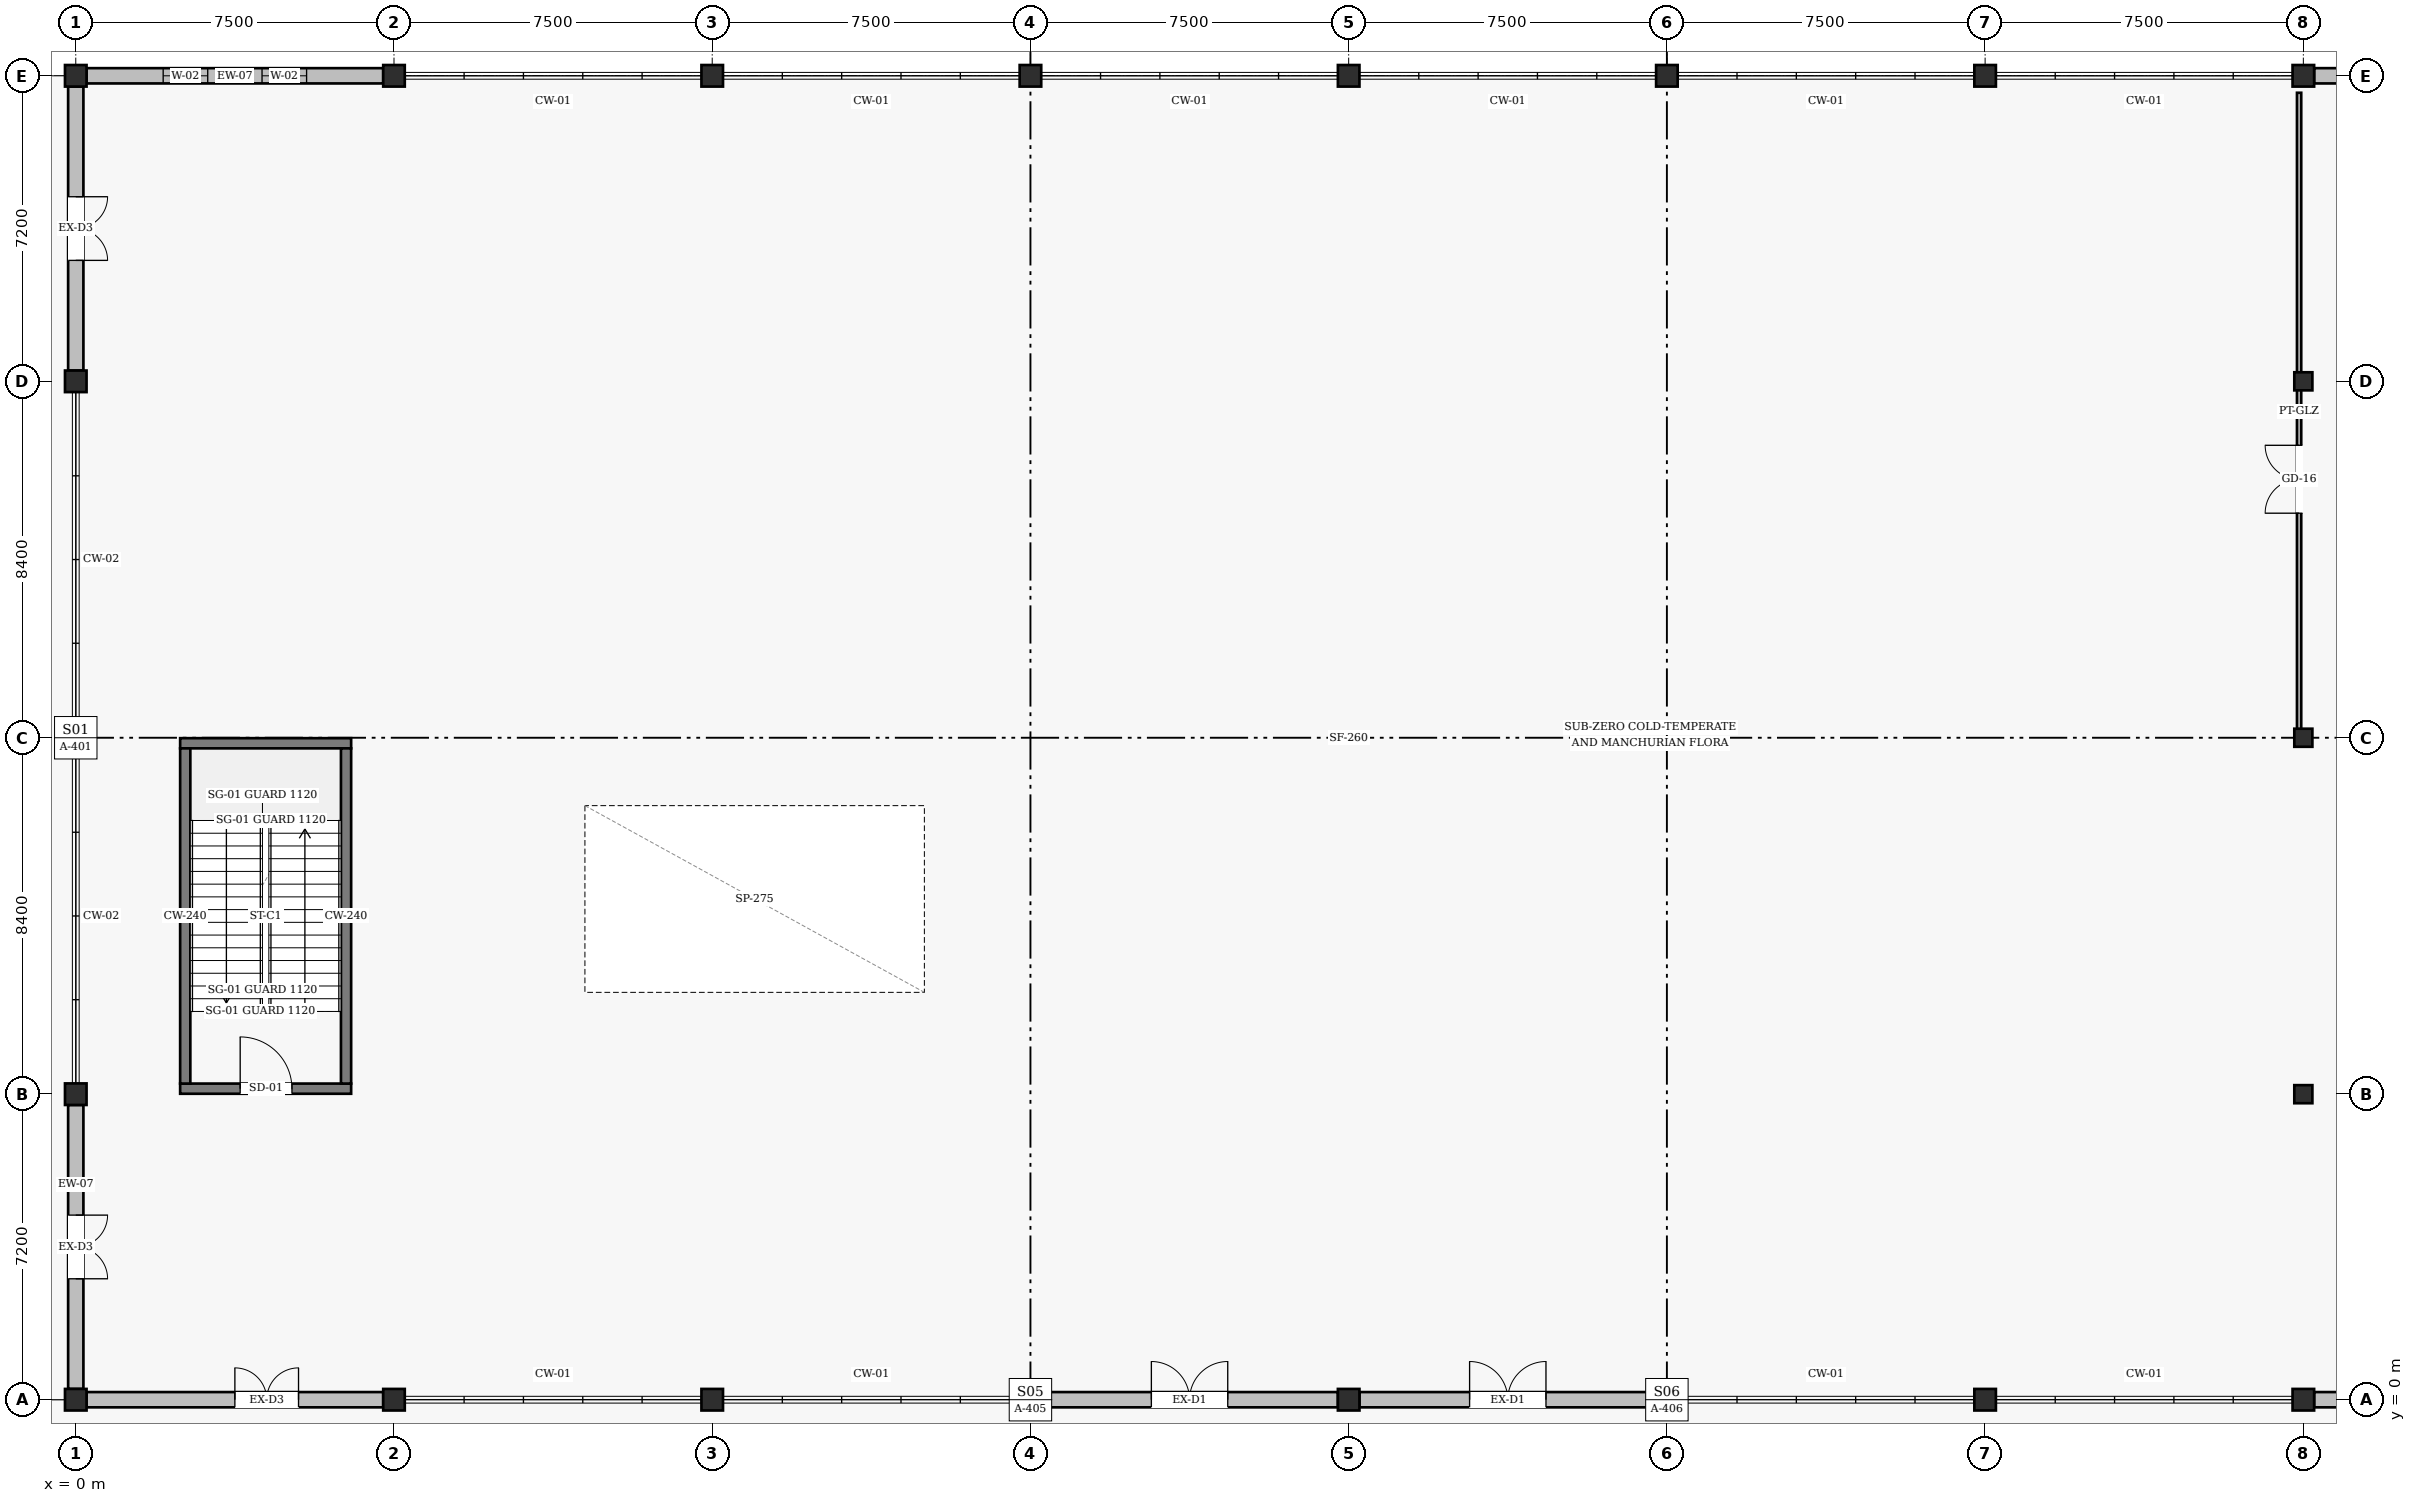
"""IFC4 building model, lengths in metres.
Left out: names, types, materials, properties, quantities, classifications, styles, units other than length and angle.
Written with IfcOpenShell. Run it as: python <this file> out.ifc"""

import sys

from ifc_helpers import new_model, si_unit, direction, frame, frame_2d, origin, origin_2d, place, context, subcontext, project, spatial, rectangle, hollow_circle, extrude, element, fill, save


model = new_model("IFC4")
c1 = context("Model", 3, precision=1e-05, world=origin(), true_north=direction((0.0, 1.0)))
c2 = subcontext(c1, "Body", "Model", "MODEL_VIEW")
j1 = project(units=[si_unit("LENGTHUNIT", "METRE"), si_unit("PLANEANGLEUNIT", "RADIAN")], contexts=[c1])
p1 = place(None, origin())
s1 = spatial("IfcSite", under=j1, at=p1, CompositionType="ELEMENT")
p2 = place(p1, origin())
s2 = spatial("IfcBuilding", under=s1, at=p2, CompositionType="ELEMENT")
p3 = place(p2, origin())
s3 = spatial("IfcBuildingStorey", under=s2, at=p3, CompositionType="ELEMENT", Elevation=0.0)
for number, where, z_axis, x_axis in (
    (1, (0.0, 0.0, 0.0), (0.0, 0.0, 1.0), (1.0, 0.0, 0.0)),
    (2, (0.0, 7.2, 0.0), (0.0, 0.0, 1.0), (1.0, 0.0, 0.0)),
    (3, (0.0, 15.6, 0.0), (0.0, 0.0, 1.0), (1.0, 0.0, 0.0)),
    (4, (0.0, 24.0, 0.0), (0.0, 0.0, 1.0), (1.0, 0.0, 0.0)),
    (5, (0.0, 31.2, 0.0), (0.0, 0.0, 1.0), (1.0, 0.0, 0.0)),
    (6, (7.5, 0.0, 0.0), (0.0, 0.0, 1.0), (1.0, 0.0, 0.0)),
    (7, (7.5, 31.2, 0.0), (0.0, 0.0, 1.0), (1.0, 0.0, 0.0)),
    (8, (15.0, 0.0, 0.0), (0.0, 0.0, 1.0), (1.0, 0.0, 0.0)),
    (9, (15.0, 31.2, 0.0), (0.0, 0.0, 1.0), (1.0, 0.0, 0.0)),
    (10, (22.5, 0.0, 0.0), (0.0, 0.0, 1.0), (1.0, 0.0, 0.0)),
    (11, (22.5, 31.2, 0.0), (0.0, 0.0, 1.0), (1.0, 0.0, 0.0)),
    (12, (30.0, 0.0, 0.0), (0.0, 0.0, 1.0), (1.0, 0.0, 0.0)),
    (13, (30.0, 31.2, 0.0), (0.0, 0.0, 1.0), (1.0, 0.0, 0.0)),
    (14, (37.5, 0.0, 0.0), (0.0, 0.0, 1.0), (1.0, 0.0, 0.0)),
    (15, (37.5, 31.2, 0.0), (0.0, 0.0, 1.0), (1.0, 0.0, 0.0)),
    (16, (45.0, 0.0, 0.0), (0.0, 0.0, 1.0), (1.0, 0.0, 0.0)),
    (17, (45.0, 31.2, 0.0), (0.0, 0.0, 1.0), (1.0, 0.0, 0.0)),
    (18, (52.5, 0.0, 0.0), (0.0, 0.0, 1.0), (1.0, 0.0, 0.0)),
):
    element("IfcColumn", number, at=place(p3, frame(where, z_axis=z_axis, x_axis=x_axis)), inside=s3, PredefinedType="COLUMN", context=c2, shape_type="SweptSolid", body=[
        extrude(hollow_circle(Radius=0.254, WallThickness=0.016, at=origin_2d()), origin(), (0.0, 0.0, 1.0), 4.8),
    ])
for number, where, z_axis, x_axis in (
    (19, (52.5, 7.2, 0.0), (0.0, 0.0, 1.0), (1.0, 0.0, 0.0)),
    (20, (52.5, 15.6, 0.0), (0.0, 0.0, 1.0), (1.0, 0.0, 0.0)),
    (21, (52.5, 24.0, 0.0), (0.0, 0.0, 1.0), (1.0, 0.0, 0.0)),
):
    element("IfcColumn", number, at=place(p3, frame(where, z_axis=z_axis, x_axis=x_axis)), inside=s3, PredefinedType="COLUMN", context=c2, shape_type="SweptSolid", body=[
        extrude(hollow_circle(Radius=0.213, WallThickness=0.014, at=origin_2d()), origin(), (0.0, 0.0, 1.0), 4.776),
    ])
p4 = place(p3, frame((52.5, 31.2, 0.0), z_axis=(0.0, 0.0, 1.0), x_axis=(1.0, 0.0, 0.0)))
e22 = element("IfcColumn", 22, at=p4, inside=s3, PredefinedType="COLUMN", context=c2, shape_type="SweptSolid", body=[
    extrude(hollow_circle(Radius=0.254, WallThickness=0.016, at=origin_2d()), origin(), (0.0, 0.0, 1.0), 4.8),
])
p5 = place(p3, frame((0.254, 0.0, 0.0), z_axis=(0.0, 0.0, 1.0), x_axis=(1.0, 0.0, 0.0)))
e23 = element("IfcWall", 23, at=p5, inside=s3, PredefinedType="SOLIDWALL", context=c2, shape_type="SweptSolid", body=[
    extrude(rectangle(XDim=6.992, YDim=0.36, at=frame_2d((3.496, 0.0))), origin(), (0.0, 0.0, 1.0), 4.11),
])
p6 = place(p5, frame((3.496, 0.0, 0.0)))
e24 = element("IfcOpeningElement", 24, at=p6, cuts=e23, PredefinedType="OPENING", context=c2, shape_type="SweptSolid", body=[
    extrude(rectangle(XDim=1.5, YDim=2.2, at=frame_2d((0.75, 1.1))), frame((0.0, 0.19, 0.0), z_axis=(0.0, -1.0, 0.0), x_axis=(1.0, 0.0, 0.0)), (0.0, 0.0, 1.0), 0.38),
])
p7 = place(p3, frame((22.754, 0.0, 0.0), z_axis=(0.0, 0.0, 1.0), x_axis=(1.0, 0.0, 0.0)))
e25 = element("IfcWall", 25, at=p7, inside=s3, PredefinedType="SOLIDWALL", context=c2, shape_type="SweptSolid", body=[
    extrude(rectangle(XDim=6.992, YDim=0.36, at=frame_2d((3.496, 0.0))), origin(), (0.0, 0.0, 1.0), 4.11),
])
p8 = place(p7, frame((2.596, 0.0, 0.0)))
e26 = element("IfcOpeningElement", 26, at=p8, cuts=e25, PredefinedType="OPENING", context=c2, shape_type="SweptSolid", body=[
    extrude(rectangle(XDim=1.8, YDim=2.4, at=frame_2d((0.9, 1.2))), frame((0.0, 0.19, 0.0), z_axis=(0.0, -1.0, 0.0), x_axis=(1.0, 0.0, 0.0)), (0.0, 0.0, 1.0), 0.38),
])
p9 = place(p3, frame((30.254, 0.0, 0.0), z_axis=(0.0, 0.0, 1.0), x_axis=(1.0, 0.0, 0.0)))
e27 = element("IfcWall", 27, at=p9, inside=s3, PredefinedType="SOLIDWALL", context=c2, shape_type="SweptSolid", body=[
    extrude(rectangle(XDim=6.992, YDim=0.36, at=frame_2d((3.496, 0.0))), origin(), (0.0, 0.0, 1.0), 4.11),
])
p10 = place(p9, frame((2.596, 0.0, 0.0)))
e28 = element("IfcOpeningElement", 28, at=p10, cuts=e27, PredefinedType="OPENING", context=c2, shape_type="SweptSolid", body=[
    extrude(rectangle(XDim=1.8, YDim=2.4, at=frame_2d((0.9, 1.2))), frame((0.0, 0.19, 0.0), z_axis=(0.0, -1.0, 0.0), x_axis=(1.0, 0.0, 0.0)), (0.0, 0.0, 1.0), 0.38),
])
p11 = place(p3, frame((52.754, 0.0, 0.0), z_axis=(0.0, 0.0, 1.0), x_axis=(1.0, 0.0, 0.0)))
e29 = element("IfcWall", 29, at=p11, inside=s3, PredefinedType="SOLIDWALL", context=c2, shape_type="SweptSolid", body=[
    extrude(rectangle(XDim=6.992, YDim=0.36, at=frame_2d((3.496, 0.0))), origin(), (0.0, 0.0, 1.0), 4.11),
])
p12 = place(p11, frame((2.746, 0.0, 0.0)))
e30 = element("IfcOpeningElement", 30, at=p12, cuts=e29, PredefinedType="OPENING", context=c2, shape_type="SweptSolid", body=[
    extrude(rectangle(XDim=1.5, YDim=2.2, at=frame_2d((0.75, 1.1))), frame((0.0, 0.19, 0.0), z_axis=(0.0, -1.0, 0.0), x_axis=(1.0, 0.0, 0.0)), (0.0, 0.0, 1.0), 0.38),
])
p13 = place(p3, frame((59.825, 31.2, 0.0), z_axis=(0.0, 0.0, 1.0), x_axis=(-1.0, 0.0, 0.0)))
e31 = element("IfcWall", 31, at=p13, inside=s3, PredefinedType="SOLIDWALL", context=c2, shape_type="SweptSolid", body=[
    extrude(rectangle(XDim=7.071, YDim=0.36, at=frame_2d((3.536, 0.0))), origin(), (0.0, 0.0, 1.0), 4.11),
])
p14 = place(p13, frame((1.232, 0.0, 0.8)))
e32 = element("IfcOpeningElement", 32, at=p14, cuts=e31, PredefinedType="OPENING", context=c2, shape_type="SweptSolid", body=[
    extrude(rectangle(XDim=2.25, YDim=2.15, at=frame_2d((1.125, 1.075))), frame((0.0, 0.19, 0.0), z_axis=(0.0, -1.0, 0.0), x_axis=(1.0, 0.0, 0.0)), (0.0, 0.0, 1.0), 0.38),
])
p15 = place(p3, frame((7.246, 31.2, 0.0), z_axis=(0.0, 0.0, 1.0), x_axis=(-1.0, 0.0, 0.0)))
e33 = element("IfcWall", 33, at=p15, inside=s3, PredefinedType="SOLIDWALL", context=c2, shape_type="SweptSolid", body=[
    extrude(rectangle(XDim=6.992, YDim=0.36, at=frame_2d((3.496, 0.0))), origin(), (0.0, 0.0, 1.0), 4.11),
])
p16 = place(p15, frame((1.806, 0.0, 0.9)))
e34 = element("IfcOpeningElement", 34, at=p16, cuts=e33, PredefinedType="OPENING", context=c2, shape_type="SweptSolid", body=[
    extrude(rectangle(XDim=1.05, YDim=1.95, at=frame_2d((0.525, 0.975))), frame((0.0, 0.19, 0.0), z_axis=(0.0, -1.0, 0.0), x_axis=(1.0, 0.0, 0.0)), (0.0, 0.0, 1.0), 0.38),
])
p17 = place(p15, frame((4.136, 0.0, 0.9)))
e35 = element("IfcOpeningElement", 35, at=p17, cuts=e33, PredefinedType="OPENING", context=c2, shape_type="SweptSolid", body=[
    extrude(rectangle(XDim=1.05, YDim=1.95, at=frame_2d((0.525, 0.975))), frame((0.0, 0.19, 0.0), z_axis=(0.0, -1.0, 0.0), x_axis=(1.0, 0.0, 0.0)), (0.0, 0.0, 1.0), 0.38),
])
p18 = place(p3, frame((0.0, 30.946, 0.0), z_axis=(0.0, 0.0, 1.0), x_axis=(0.0, -1.0, 0.0)))
e36 = element("IfcWall", 36, at=p18, inside=s3, PredefinedType="SOLIDWALL", context=c2, shape_type="SweptSolid", body=[
    extrude(rectangle(XDim=6.692, YDim=0.36, at=frame_2d((3.346, 0.0))), origin(), (0.0, 0.0, 1.0), 4.22),
])
p19 = place(p18, frame((2.596, 0.0, 0.0)))
e37 = element("IfcOpeningElement", 37, at=p19, cuts=e36, PredefinedType="OPENING", context=c2, shape_type="SweptSolid", body=[
    extrude(rectangle(XDim=1.5, YDim=2.2, at=frame_2d((0.75, 1.1))), frame((0.0, 0.19, 0.0), z_axis=(0.0, -1.0, 0.0), x_axis=(1.0, 0.0, 0.0)), (0.0, 0.0, 1.0), 0.38),
])
p20 = place(p3, frame((0.0, 6.946, 0.0), z_axis=(0.0, 0.0, 1.0), x_axis=(0.0, -1.0, 0.0)))
e38 = element("IfcWall", 38, at=p20, inside=s3, PredefinedType="SOLIDWALL", context=c2, shape_type="SweptSolid", body=[
    extrude(rectangle(XDim=6.692, YDim=0.36, at=frame_2d((3.346, 0.0))), origin(), (0.0, 0.0, 1.0), 4.22),
])
p21 = place(p20, frame((2.596, 0.0, 0.0)))
e39 = element("IfcOpeningElement", 39, at=p21, cuts=e38, PredefinedType="OPENING", context=c2, shape_type="SweptSolid", body=[
    extrude(rectangle(XDim=1.5, YDim=2.2, at=frame_2d((0.75, 1.1))), frame((0.0, 0.19, 0.0), z_axis=(0.0, -1.0, 0.0), x_axis=(1.0, 0.0, 0.0)), (0.0, 0.0, 1.0), 0.38),
])
p22 = place(p3, frame((2.46, 7.33, 0.0), z_axis=(0.0, 0.0, 1.0), x_axis=(1.0, 0.0, 0.0)))
e40 = element("IfcWall", 40, at=p22, inside=s3, PredefinedType="SHEAR", context=c2, shape_type="SweptSolid", body=[
    extrude(rectangle(XDim=4.03, YDim=0.24, at=frame_2d((2.015, 0.0))), origin(), (0.0, 0.0, 1.0), 4.56),
])
p23 = place(p22, frame((1.415, 0.0, 0.0)))
e41 = element("IfcOpeningElement", 41, at=p23, cuts=e40, PredefinedType="OPENING", context=c2, shape_type="SweptSolid", body=[
    extrude(rectangle(XDim=1.22, YDim=2.18, at=frame_2d((0.61, 1.09))), frame((0.0, 0.13, 0.0), z_axis=(0.0, -1.0, 0.0), x_axis=(1.0, 0.0, 0.0)), (0.0, 0.0, 1.0), 0.26),
])
p24 = place(p3, frame((2.46, 15.47, 0.0), z_axis=(0.0, 0.0, 1.0), x_axis=(1.0, 0.0, 0.0)))
e42 = element("IfcWall", 42, at=p24, inside=s3, PredefinedType="SHEAR", context=c2, shape_type="SweptSolid", body=[
    extrude(rectangle(XDim=4.03, YDim=0.24, at=frame_2d((2.015, 0.0))), origin(), (0.0, 0.0, 1.0), 4.56),
])
for number, where, z_axis, x_axis in (
    (43, (2.58, 7.45, 0.0), (0.0, 0.0, 1.0), (0.0, 1.0, 0.0)),
    (44, (6.37, 7.45, 0.0), (0.0, 0.0, 1.0), (0.0, 1.0, 0.0)),
):
    element("IfcWall", number, at=place(p3, frame(where, z_axis=z_axis, x_axis=x_axis)), inside=s3, PredefinedType="SHEAR", context=c2, shape_type="SweptSolid", body=[
        extrude(rectangle(XDim=7.9, YDim=0.24, at=frame_2d((3.95, 0.0))), origin(), (0.0, 0.0, 1.0), 4.56),
    ])
p25 = place(p3, frame((52.4, 15.8, 0.0), z_axis=(0.0, 0.0, 1.0), x_axis=(0.0, 1.0, 0.0)))
e45 = element("IfcWall", 45, at=p25, inside=s3, PredefinedType="PARTITIONING", context=c2, shape_type="SweptSolid", body=[
    extrude(rectangle(XDim=15.0, YDim=0.1, at=frame_2d((7.5, 0.0))), origin(), (0.0, 0.0, 1.0), 4.06),
])
p26 = place(p25, frame((5.092, 0.0, 0.0)))
e46 = element("IfcOpeningElement", 46, at=p26, cuts=e45, PredefinedType="OPENING", context=c2, shape_type="SweptSolid", body=[
    extrude(rectangle(XDim=1.6, YDim=2.1, at=frame_2d((0.8, 1.05))), frame((0.0, 0.06, 0.0), z_axis=(0.0, -1.0, 0.0), x_axis=(1.0, 0.0, 0.0)), (0.0, 0.0, 1.0), 0.12),
])
p27 = place(p6, frame((1.5, 0.0, 0.0), z_axis=(0.0, 0.0, 1.0), x_axis=(-1.0, 0.0, 0.0)))
e47 = element("IfcDoor", 47, at=p27, inside=s3, OperationType="DOUBLE_DOOR_SINGLE_SWING", PredefinedType="DOOR", context=c2, shape_type="SweptSolid", body=[
    extrude(rectangle(XDim=1.5, YDim=2.2, at=frame_2d((0.75, 1.1))), frame((0.0, 0.025, 0.0), z_axis=(0.0, -1.0, 0.0), x_axis=(1.0, 0.0, 0.0)), (0.0, 0.0, 1.0), 0.05),
])
fill(e24, e47)
p28 = place(p8, frame((1.8, 0.0, 0.0), z_axis=(0.0, 0.0, 1.0), x_axis=(-1.0, 0.0, 0.0)))
e48 = element("IfcDoor", 48, at=p28, inside=s3, OperationType="DOUBLE_DOOR_SINGLE_SWING", PredefinedType="DOOR", context=c2, shape_type="SweptSolid", body=[
    extrude(rectangle(XDim=1.8, YDim=2.4, at=frame_2d((0.9, 1.2))), frame((0.0, 0.025, 0.0), z_axis=(0.0, -1.0, 0.0), x_axis=(1.0, 0.0, 0.0)), (0.0, 0.0, 1.0), 0.05),
])
fill(e26, e48)
p29 = place(p10, frame((1.8, 0.0, 0.0), z_axis=(0.0, 0.0, 1.0), x_axis=(-1.0, 0.0, 0.0)))
e49 = element("IfcDoor", 49, at=p29, inside=s3, OperationType="DOUBLE_DOOR_SINGLE_SWING", PredefinedType="DOOR", context=c2, shape_type="SweptSolid", body=[
    extrude(rectangle(XDim=1.8, YDim=2.4, at=frame_2d((0.9, 1.2))), frame((0.0, 0.025, 0.0), z_axis=(0.0, -1.0, 0.0), x_axis=(1.0, 0.0, 0.0)), (0.0, 0.0, 1.0), 0.05),
])
fill(e28, e49)
p30 = place(p16, origin())
e50 = element("IfcWindow", 50, at=p30, inside=s3, PartitioningType="SINGLE_PANEL", PredefinedType="WINDOW", context=c2, shape_type="SweptSolid", body=[
    extrude(rectangle(XDim=1.05, YDim=1.95, at=frame_2d((0.525, 0.975))), frame((0.0, 0.03, 0.0), z_axis=(0.0, -1.0, 0.0), x_axis=(1.0, 0.0, 0.0)), (0.0, 0.0, 1.0), 0.06),
])
fill(e34, e50)
p31 = place(p17, origin())
e51 = element("IfcWindow", 51, at=p31, inside=s3, PartitioningType="SINGLE_PANEL", PredefinedType="WINDOW", context=c2, shape_type="SweptSolid", body=[
    extrude(rectangle(XDim=1.05, YDim=1.95, at=frame_2d((0.525, 0.975))), frame((0.0, 0.03, 0.0), z_axis=(0.0, -1.0, 0.0), x_axis=(1.0, 0.0, 0.0)), (0.0, 0.0, 1.0), 0.06),
])
fill(e35, e51)
p32 = place(p19, frame((1.5, 0.0, 0.0), z_axis=(0.0, 0.0, 1.0), x_axis=(-1.0, 0.0, 0.0)))
e52 = element("IfcDoor", 52, at=p32, inside=s3, OperationType="DOUBLE_DOOR_SINGLE_SWING", PredefinedType="DOOR", context=c2, shape_type="SweptSolid", body=[
    extrude(rectangle(XDim=1.5, YDim=2.2, at=frame_2d((0.75, 1.1))), frame((0.0, 0.025, 0.0), z_axis=(0.0, -1.0, 0.0), x_axis=(1.0, 0.0, 0.0)), (0.0, 0.0, 1.0), 0.05),
])
fill(e37, e52)
p33 = place(p21, frame((1.5, 0.0, 0.0), z_axis=(0.0, 0.0, 1.0), x_axis=(-1.0, 0.0, 0.0)))
e53 = element("IfcDoor", 53, at=p33, inside=s3, OperationType="DOUBLE_DOOR_SINGLE_SWING", PredefinedType="DOOR", context=c2, shape_type="SweptSolid", body=[
    extrude(rectangle(XDim=1.5, YDim=2.2, at=frame_2d((0.75, 1.1))), frame((0.0, 0.025, 0.0), z_axis=(0.0, -1.0, 0.0), x_axis=(1.0, 0.0, 0.0)), (0.0, 0.0, 1.0), 0.05),
])
fill(e39, e53)
p34 = place(p23, origin())
e54 = element("IfcDoor", 54, at=p34, inside=s3, OperationType="SINGLE_SWING_LEFT", PredefinedType="DOOR", context=c2, shape_type="SweptSolid", body=[
    extrude(rectangle(XDim=1.22, YDim=2.18, at=frame_2d((0.61, 1.09))), frame((0.0, 0.025, 0.0), z_axis=(0.0, -1.0, 0.0), x_axis=(1.0, 0.0, 0.0)), (0.0, 0.0, 1.0), 0.05),
])
fill(e41, e54)
p35 = place(p26, origin())
e55 = element("IfcDoor", 55, at=p35, inside=s3, OperationType="DOUBLE_DOOR_SINGLE_SWING", PredefinedType="DOOR", context=c2, shape_type="SweptSolid", body=[
    extrude(rectangle(XDim=1.6, YDim=2.1, at=frame_2d((0.8, 1.05))), frame((0.0, 0.025, 0.0), z_axis=(0.0, -1.0, 0.0), x_axis=(1.0, 0.0, 0.0)), (0.0, 0.0, 1.0), 0.05),
])
fill(e46, e55)
save(model, sys.argv[1])
